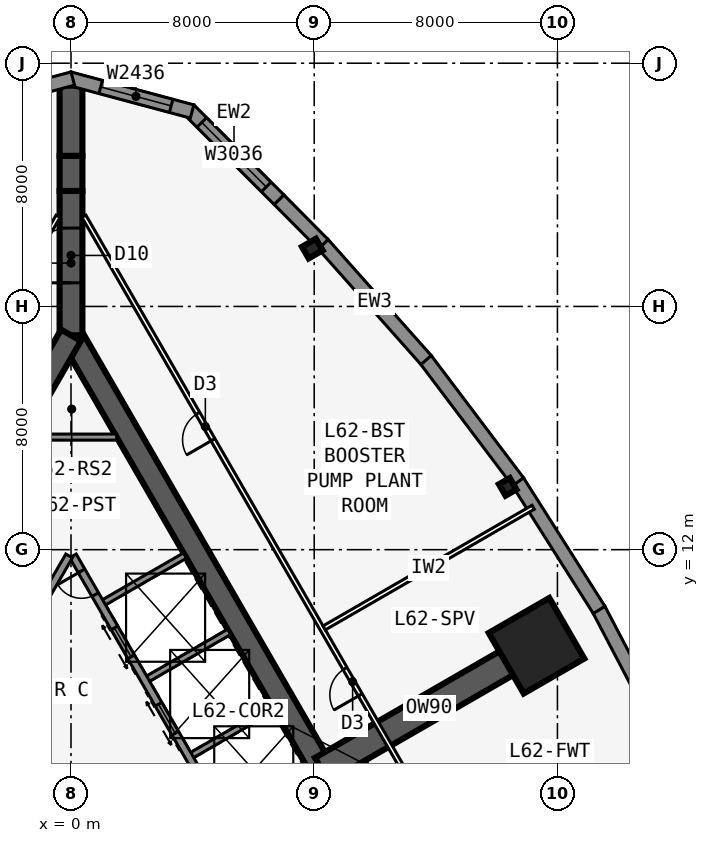
"""IFC4 building model, lengths in metres.
Left out: names, types, materials, properties, quantities, classifications, styles, units other than length and angle.
Written with IfcOpenShell. Run it as: python <this file> out.ifc"""

import sys

from ifc_helpers import new_model, si_unit, direction, frame, frame_2d, origin, origin_2d, place, context, subcontext, project, spatial, polyline, rectangle, i_section, outline, extrude, element, fill, save


model = new_model("IFC4")
c1 = context("Model", 3, precision=1e-05, world=origin(), true_north=direction((0.0, 1.0)))
c2 = subcontext(c1, "Body", "Model", "MODEL_VIEW")
j1 = project(units=[si_unit("LENGTHUNIT", "METRE"), si_unit("PLANEANGLEUNIT", "RADIAN")], contexts=[c1])
p1 = place(None, origin())
s1 = spatial("IfcSite", under=j1, at=p1, CompositionType="ELEMENT")
p2 = place(p1, origin())
s2 = spatial("IfcBuilding", under=s1, at=p2, CompositionType="ELEMENT")
p3 = place(p2, frame((0.0, 0.0, 233.3)))
s3 = spatial("IfcBuildingStorey", under=s2, at=p3, CompositionType="ELEMENT", Elevation=233.3)
p4 = place(p3, frame((8.25, 4.763, 0.0), z_axis=(0.0, 0.0, 1.0), x_axis=(-0.500002952946, 0.866023698893, 0.0)))
e1 = element("IfcWall", 1, at=p4, inside=s3, PredefinedType="SHEAR", context=c2, shape_type="SweptSolid", body=[
    extrude(rectangle(XDim=16.5, YDim=0.75, at=frame_2d((8.25, 0.0))), origin(), (0.0, 0.0, 1.0), 6.0),
])
p5 = place(p3, frame((5.379, 2.586, 0.0), z_axis=(0.0, 0.0, 1.0), x_axis=(-0.500001375892, 0.866024609411, 0.0)))
e2 = element("IfcWall", 2, at=p5, inside=s3, PredefinedType="SOLIDWALL", context=c2, shape_type="SweptSolid", body=[
    extrude(rectangle(XDim=10.633, YDim=0.25, at=frame_2d((5.316, 0.0))), origin(), (0.0, 0.0, 1.0), 5.75),
])
p6 = place(p5, frame((9.164, 0.0, 0.0)))
e3 = element("IfcOpeningElement", 3, at=p6, cuts=e2, PredefinedType="OPENING", context=c2, shape_type="SweptSolid", body=[
    extrude(rectangle(XDim=0.9, YDim=2.13, at=frame_2d((0.45, 1.065))), frame((0.0, 0.135, 0.0), z_axis=(0.0, -1.0, 0.0), x_axis=(1.0, 0.0, 0.0)), (0.0, 0.0, 1.0), 0.27),
])
p7 = place(p5, frame((1.0, 0.0, 0.0)))
e4 = element("IfcOpeningElement", 4, at=p7, cuts=e2, PredefinedType="OPENING", context=c2, shape_type="SweptSolid", body=[
    extrude(rectangle(XDim=1.1, YDim=2.13, at=frame_2d((0.55, 1.065))), frame((0.0, 0.135, 0.0), z_axis=(0.0, -1.0, 0.0), x_axis=(1.0, 0.0, 0.0)), (0.0, 0.0, 1.0), 0.27),
])
p8 = place(p5, frame((3.9, 0.0, 0.0)))
e5 = element("IfcOpeningElement", 5, at=p8, cuts=e2, PredefinedType="OPENING", context=c2, shape_type="SweptSolid", body=[
    extrude(rectangle(XDim=1.1, YDim=2.13, at=frame_2d((0.55, 1.065))), frame((0.0, 0.135, 0.0), z_axis=(0.0, -1.0, 0.0), x_axis=(1.0, 0.0, 0.0)), (0.0, 0.0, 1.0), 0.27),
])
p9 = place(p5, frame((6.8, 0.0, 0.0)))
e6 = element("IfcOpeningElement", 6, at=p9, cuts=e2, PredefinedType="OPENING", context=c2, shape_type="SweptSolid", body=[
    extrude(rectangle(XDim=1.1, YDim=2.13, at=frame_2d((0.55, 1.065))), frame((0.0, 0.135, 0.0), z_axis=(0.0, -1.0, 0.0), x_axis=(1.0, 0.0, 0.0)), (0.0, 0.0, 1.0), 0.27),
])
for number, where, z_axis, x_axis in (
    (7, (3.879, 5.184, 0.0), (0.0, 0.0, 1.0), (0.866, 0.5, 0.0)),
    (8, (2.429, 7.696, 0.0), (0.0, 0.0, 1.0), (0.866, 0.5, 0.0)),
    (9, (0.979, 10.207, 0.0), (0.0, 0.0, 1.0), (0.866, 0.5, 0.0)),
):
    element("IfcWall", number, at=place(p3, frame(where, z_axis=z_axis, x_axis=x_axis)), inside=s3, PredefinedType="SOLIDWALL", context=c2, shape_type="SweptSolid", body=[
        extrude(rectangle(XDim=3.2, YDim=0.2, at=frame_2d((1.6, 0.0))), origin(), (0.0, 0.0, 1.0), 5.75),
    ])
p10 = place(p3, frame((0.0, 19.052, 0.0), z_axis=(0.0, 0.0, 1.0), x_axis=(-0.500002952946, -0.866023698893, 0.0)))
e10 = element("IfcWall", 10, at=p10, inside=s3, PredefinedType="SHEAR", context=c2, shape_type="SweptSolid", body=[
    extrude(rectangle(XDim=16.5, YDim=0.75, at=frame_2d((8.25, 0.0))), origin(), (0.0, 0.0, 1.0), 6.0),
])
p11 = place(p10, frame((14.15, 0.0, 0.0)))
e11 = element("IfcOpeningElement", 11, at=p11, cuts=e10, PredefinedType="OPENING", context=c2, shape_type="SweptSolid", body=[
    extrude(rectangle(XDim=1.8, YDim=2.13, at=frame_2d((0.9, 1.065))), frame((0.0, 0.385, 0.0), z_axis=(0.0, -1.0, 0.0), x_axis=(1.0, 0.0, 0.0)), (0.0, 0.0, 1.0), 0.77),
])
p12 = place(p10, frame((12.6, 0.0, 0.0)))
e12 = element("IfcOpeningElement", 12, at=p12, cuts=e10, PredefinedType="OPENING", context=c2, shape_type="SweptSolid", body=[
    extrude(rectangle(XDim=1.0, YDim=2.13, at=frame_2d((0.5, 1.065))), frame((0.0, 0.385, 0.0), z_axis=(0.0, -1.0, 0.0), x_axis=(1.0, 0.0, 0.0)), (0.0, 0.0, 1.0), 0.77),
])
p13 = place(p3, frame((-0.062, 11.794, 0.0), z_axis=(0.0, 0.0, 1.0), x_axis=(-0.500006680225, -0.86602154692, 0.0)))
e13 = element("IfcWall", 13, at=p13, inside=s3, PredefinedType="SOLIDWALL", context=c2, shape_type="SweptSolid", body=[
    extrude(rectangle(XDim=7.733, YDim=0.25, at=frame_2d((3.866, 0.0))), origin(), (0.0, 0.0, 1.0), 5.75),
])
p14 = place(p3, frame((0.0, 19.052, 0.0), z_axis=(0.0, 0.0, 1.0), x_axis=(0.0, 1.0, 0.0)))
e14 = element("IfcWall", 14, at=p14, inside=s3, PredefinedType="SHEAR", context=c2, shape_type="SweptSolid", body=[
    extrude(rectangle(XDim=4.746, YDim=0.75, at=frame_2d((2.373, 0.0))), origin(), (0.0, 0.0, 1.0), 6.0),
])
p15 = place(p14, frame((1.725, 0.0, 0.0)))
e15 = element("IfcOpeningElement", 15, at=p15, cuts=e14, PredefinedType="OPENING", context=c2, shape_type="SweptSolid", body=[
    extrude(rectangle(XDim=1.8, YDim=2.13, at=frame_2d((0.9, 1.065))), frame((0.0, 0.385, 0.0), z_axis=(0.0, -1.0, 0.0), x_axis=(1.0, 0.0, 0.0)), (0.0, 0.0, 1.0), 0.77),
])
p16 = place(p3, frame((0.0, 23.799, 0.0), z_axis=(0.0, 0.0, 1.0), x_axis=(0.0, 1.0, 0.0)))
e16 = element("IfcWall", 16, at=p16, inside=s3, PredefinedType="SHEAR", context=c2, shape_type="SweptSolid", body=[
    extrude(rectangle(XDim=1.155, YDim=0.75, at=frame_2d((0.577, 0.0))), origin(), (0.0, 0.0, 1.0), 6.0),
])
p17 = place(p3, frame((0.0, 24.953, 0.0), z_axis=(0.0, 0.0, 1.0), x_axis=(0.0, 1.0, 0.0)))
e17 = element("IfcWall", 17, at=p17, inside=s3, PredefinedType="SHEAR", context=c2, shape_type="SweptSolid", body=[
    extrude(rectangle(XDim=2.309, YDim=0.75, at=frame_2d((1.155, 0.0))), origin(), (0.0, 0.0, 1.0), 6.0),
])
p18 = place(p3, frame((8.25, 4.763, 0.0), z_axis=(0.0, 0.0, 1.0), x_axis=(0.866023543838, 0.500003221507, 0.0)))
e18 = element("IfcWall", 18, at=p18, inside=s3, PredefinedType="SHEAR", context=c2, shape_type="SweptSolid", body=[
    extrude(rectangle(XDim=8.154, YDim=0.9, at=frame_2d((4.077, 0.0))), origin(), (0.0, 0.0, 1.0), 6.0),
])
p19 = place(p3, frame((14.363, 14.066, 0.0), z_axis=(0.0, 0.0, 1.0), x_axis=(0.866025403784, 0.5, 0.0)))
e19 = element("IfcColumn", 19, at=p19, inside=s3, PredefinedType="COLUMN", context=c2, shape_type="SweptSolid", body=[
    extrude(i_section(OverallWidth=0.411, OverallDepth=0.434, WebThickness=0.036, FlangeThickness=0.057, at=origin_2d()), origin(), (0.0, 0.0, 1.0), 6.0),
])
p20 = place(p3, frame((7.937, 21.903, 0.0), z_axis=(0.0, 0.0, 1.0), x_axis=(-0.5, 0.866025403784, 0.0)))
e20 = element("IfcColumn", 20, at=p20, inside=s3, PredefinedType="COLUMN", context=c2, shape_type="SweptSolid", body=[
    extrude(i_section(OverallWidth=0.442, OverallDepth=0.531, WebThickness=0.066, FlangeThickness=0.106, at=origin_2d()), origin(), (0.0, 0.0, 1.0), 6.0),
])
p21 = place(p3, frame((15.312, 8.84, 0.0), z_axis=(0.0, 0.0, 1.0), x_axis=(0.866025403784, 0.5, 0.0)))
e21 = element("IfcColumn", 21, at=p21, inside=s3, PredefinedType="COLUMN", context=c2, shape_type="SweptSolid", body=[
    extrude(rectangle(XDim=2.3, YDim=2.3, at=origin_2d()), origin(), (0.0, 0.0, 1.0), 6.0),
])
p22 = place(p3, frame((19.684, 5.602, 0.0), z_axis=(0.0, 0.0, 1.0), x_axis=(-0.463976002579, 0.885847768542, 0.0)))
e22 = element("IfcWall", 22, at=p22, inside=s3, PredefinedType="SOLIDWALL", context=c2, shape_type="SweptSolid", body=[
    extrude(outline(polyline([(0.0, 0.0), (5.004, 0.0), (5.004, 5.75), (0.0, 5.75), (0.0, 0.0)]), holes=[polyline([(4.402, 2.875), (4.337, 3.367), (4.147, 3.825), (3.846, 4.219), (3.452, 4.52), (2.994, 4.71), (2.502, 4.775), (2.01, 4.71), (1.552, 4.52), (1.159, 4.219), (0.857, 3.825), (0.667, 3.367), (0.602, 2.875), (0.667, 2.383), (0.857, 1.925), (1.159, 1.531), (1.552, 1.229), (2.01, 1.04), (2.502, 0.975), (2.994, 1.04), (3.452, 1.229), (3.846, 1.531), (4.147, 1.925), (4.337, 2.383), (4.402, 2.875)])]), frame((0.0, 0.225, 0.0), z_axis=(0.0, -1.0, 0.0), x_axis=(1.0, 0.0, 0.0)), (0.0, 0.0, 1.0), 0.45),
])
p23 = place(p3, frame((17.371, 10.019, 0.0), z_axis=(0.0, 0.0, 1.0), x_axis=(-0.535242418236, 0.844698498709, 0.0)))
e23 = element("IfcWall", 23, at=p23, inside=s3, PredefinedType="SOLIDWALL", context=c2, shape_type="SweptSolid", body=[
    extrude(outline(polyline([(0.0, 0.0), (5.004, 0.0), (5.004, 5.75), (0.0, 5.75), (0.0, 0.0)]), holes=[polyline([(4.402, 2.875), (4.337, 3.367), (4.148, 3.825), (3.846, 4.219), (3.452, 4.52), (2.994, 4.71), (2.502, 4.775), (2.01, 4.71), (1.552, 4.52), (1.159, 4.219), (0.857, 3.825), (0.667, 3.367), (0.602, 2.875), (0.667, 2.383), (0.857, 1.925), (1.159, 1.531), (1.552, 1.229), (2.01, 1.04), (2.502, 0.975), (2.994, 1.04), (3.452, 1.229), (3.846, 1.531), (4.148, 1.925), (4.337, 2.383), (4.402, 2.875)])]), frame((0.0, 0.225, 0.0), z_axis=(0.0, -1.0, 0.0), x_axis=(1.0, 0.0, 0.0)), (0.0, 0.0, 1.0), 0.45),
])
p24 = place(p3, frame((14.703, 14.231, 0.0), z_axis=(0.0, 0.0, 1.0), x_axis=(-0.602408653511, 0.798187831388, 0.0)))
e24 = element("IfcWall", 24, at=p24, inside=s3, PredefinedType="SOLIDWALL", context=c2, shape_type="SweptSolid", body=[
    extrude(outline(polyline([(0.0, 0.0), (5.038, 0.0), (5.038, 5.75), (0.0, 5.75), (0.0, 0.0)]), holes=[polyline([(4.419, 2.875), (4.354, 3.367), (4.164, 3.825), (3.863, 4.219), (3.469, 4.52), (3.011, 4.71), (2.519, 4.775), (2.027, 4.71), (1.569, 4.52), (1.176, 4.219), (0.874, 3.825), (0.684, 3.367), (0.619, 2.875), (0.684, 2.383), (0.874, 1.925), (1.176, 1.531), (1.569, 1.229), (2.027, 1.04), (2.519, 0.975), (3.011, 1.04), (3.469, 1.229), (3.863, 1.531), (4.164, 1.925), (4.354, 2.383), (4.419, 2.875)])]), frame((0.0, 0.225, 0.0), z_axis=(0.0, -1.0, 0.0), x_axis=(1.0, 0.0, 0.0)), (0.0, 0.0, 1.0), 0.45),
])
p25 = place(p3, frame((11.68, 18.238, 0.0), z_axis=(0.0, 0.0, 1.0), x_axis=(-0.664375712375, 0.747398764253, 0.0)))
e25 = element("IfcWall", 25, at=p25, inside=s3, PredefinedType="SOLIDWALL", context=c2, shape_type="SweptSolid", body=[
    extrude(outline(polyline([(0.0, 0.0), (5.105, 0.0), (5.105, 5.75), (0.0, 5.75), (0.0, 0.0)]), holes=[polyline([(4.502, 2.875), (4.436, 3.38), (4.241, 3.85), (3.931, 4.254), (3.527, 4.564), (3.057, 4.759), (2.552, 4.825), (2.048, 4.759), (1.577, 4.564), (1.174, 4.254), (0.864, 3.85), (0.669, 3.38), (0.602, 2.875), (0.669, 2.37), (0.864, 1.9), (1.174, 1.496), (1.577, 1.186), (2.048, 0.991), (2.552, 0.925), (3.057, 0.991), (3.527, 1.186), (3.931, 1.496), (4.241, 1.9), (4.436, 2.37), (4.502, 2.875)])]), frame((0.0, 0.225, 0.0), z_axis=(0.0, -1.0, 0.0), x_axis=(1.0, 0.0, 0.0)), (0.0, 0.0, 1.0), 0.45),
])
p26 = place(p3, frame((8.297, 22.044, 0.0), z_axis=(0.0, 0.0, 1.0), x_axis=(-0.704208960141, 0.709992774933, 0.0)))
e26 = element("IfcWall", 26, at=p26, inside=s3, PredefinedType="SOLIDWALL", context=c2, shape_type="SweptSolid", body=[
    extrude(rectangle(XDim=2.068, YDim=0.45, at=frame_2d((1.034, 0.0))), origin(), (0.0, 0.0, 1.0), 5.75),
])
p27 = place(p3, frame((6.841, 23.512, 0.0), z_axis=(0.0, 0.0, 1.0), x_axis=(-0.707106781187, 0.707106781187, 0.0)))
e27 = element("IfcWall", 27, at=p27, inside=s3, PredefinedType="SOLIDWALL", context=c2, shape_type="SweptSolid", body=[
    extrude(rectangle(XDim=4.184, YDim=0.45, at=frame_2d((2.092, 0.0))), origin(), (0.0, 0.0, 1.0), 5.75),
])
p28 = place(p27, frame((0.592, 0.0, 0.9)))
e28 = element("IfcOpeningElement", 28, at=p28, cuts=e27, PredefinedType="OPENING", context=c2, shape_type="SweptSolid", body=[
    extrude(rectangle(XDim=3.0, YDim=3.6, at=frame_2d((1.5, 1.8))), frame((0.0, 0.235, 0.0), z_axis=(0.0, -1.0, 0.0), x_axis=(1.0, 0.0, 0.0)), (0.0, 0.0, 1.0), 0.47),
])
p29 = place(p3, frame((3.983, 26.413, 0.0), z_axis=(0.0, 0.0, 1.0), x_axis=(-0.965920442324, 0.258839137498, 0.0)))
e29 = element("IfcWall", 29, at=p29, inside=s3, PredefinedType="SOLIDWALL", context=c2, shape_type="SweptSolid", body=[
    extrude(outline(polyline([(4.184, 0.225), (4.124, 0.225), (3.706, 0.113), (3.676, 0.225), (0.0, 0.225), (0.0, -0.225), (4.184, -0.225), (4.184, 0.225)])), origin(), (0.0, 0.0, 1.0), 5.75),
])
p30 = place(p29, frame((0.713, 0.0, 0.9)))
e30 = element("IfcOpeningElement", 30, at=p30, cuts=e29, PredefinedType="OPENING", context=c2, shape_type="SweptSolid", body=[
    extrude(rectangle(XDim=2.4, YDim=3.6, at=frame_2d((1.2, 1.8))), frame((0.0, 0.235, 0.0), z_axis=(0.0, -1.0, 0.0), x_axis=(1.0, 0.0, 0.0)), (0.0, 0.0, 1.0), 0.47),
])
p31 = place(p3, frame((0.058, 27.496, 0.0), z_axis=(0.0, 0.0, 1.0), x_axis=(-0.965920442324, -0.258839137498, 0.0)))
e31 = element("IfcWall", 31, at=p31, inside=s3, PredefinedType="SOLIDWALL", context=c2, shape_type="SweptSolid", body=[
    extrude(outline(polyline([(4.184, 0.225), (0.509, 0.225), (0.479, 0.113), (0.06, 0.225), (0.0, 0.225), (0.0, -0.225), (4.184, -0.225), (4.184, 0.225)])), origin(), (0.0, 0.0, 1.0), 5.75),
])
p32 = place(p31, frame((1.071, 0.0, 0.9)))
e32 = element("IfcOpeningElement", 32, at=p32, cuts=e31, PredefinedType="OPENING", context=c2, shape_type="SweptSolid", body=[
    extrude(rectangle(XDim=2.4, YDim=3.6, at=frame_2d((1.2, 1.8))), frame((0.0, 0.235, 0.0), z_axis=(0.0, -1.0, 0.0), x_axis=(1.0, 0.0, 0.0)), (0.0, 0.0, 1.0), 0.47),
])
p33 = place(p3, frame((20.102, -11.115, 0.0), z_axis=(0.0, 0.0, 1.0), x_axis=(-0.500000265775, 0.866025250339, 0.0)))
e33 = element("IfcWall", 33, at=p33, inside=s3, PredefinedType="PARTITIONING", context=c2, shape_type="SweptSolid", body=[
    extrude(rectangle(XDim=39.354, YDim=0.15, at=frame_2d((19.677, 0.0))), origin(), (0.0, 0.0, 1.0), 5.75),
])
p34 = place(p33, frame((9.489, 0.0, 0.0)))
e34 = element("IfcOpeningElement", 34, at=p34, cuts=e33, PredefinedType="OPENING", context=c2, shape_type="SweptSolid", body=[
    extrude(rectangle(XDim=1.0, YDim=2.13, at=frame_2d((0.5, 1.065))), frame((0.0, 0.085, 0.0), z_axis=(0.0, -1.0, 0.0), x_axis=(1.0, 0.0, 0.0)), (0.0, 0.0, 1.0), 0.17),
])
p35 = place(p33, frame((21.177, 0.0, 0.0)))
e35 = element("IfcOpeningElement", 35, at=p35, cuts=e33, PredefinedType="OPENING", context=c2, shape_type="SweptSolid", body=[
    extrude(rectangle(XDim=1.0, YDim=2.13, at=frame_2d((0.5, 1.065))), frame((0.0, 0.085, 0.0), z_axis=(0.0, -1.0, 0.0), x_axis=(1.0, 0.0, 0.0)), (0.0, 0.0, 1.0), 0.17),
])
p36 = place(p33, frame((30.865, 0.0, 0.0)))
e36 = element("IfcOpeningElement", 36, at=p36, cuts=e33, PredefinedType="OPENING", context=c2, shape_type="SweptSolid", body=[
    extrude(rectangle(XDim=1.0, YDim=2.13, at=frame_2d((0.5, 1.065))), frame((0.0, 0.085, 0.0), z_axis=(0.0, -1.0, 0.0), x_axis=(1.0, 0.0, 0.0)), (0.0, 0.0, 1.0), 0.17),
])
p37 = place(p3, frame((8.329, 9.427, 0.0), z_axis=(0.0, 0.0, 1.0), x_axis=(0.866027296944, 0.499996720937, 0.0)))
e37 = element("IfcWall", 37, at=p37, inside=s3, PredefinedType="PARTITIONING", context=c2, shape_type="SweptSolid", body=[
    extrude(rectangle(XDim=7.937, YDim=0.15, at=frame_2d((3.968, 0.0))), origin(), (0.0, 0.0, 1.0), 5.75),
])
p38 = place(p3, frame((-0.425, 22.966, 0.0), z_axis=(0.0, 0.0, 1.0), x_axis=(-0.500000265775, -0.866025250339, 0.0)))
e38 = element("IfcWall", 38, at=p38, inside=s3, PredefinedType="PARTITIONING", context=c2, shape_type="SweptSolid", body=[
    extrude(rectangle(XDim=39.354, YDim=0.15, at=frame_2d((19.677, 0.0))), origin(), (0.0, 0.0, 1.0), 5.75),
])
p39 = place(p38, frame((7.489, 0.0, 0.0)))
e39 = element("IfcOpeningElement", 39, at=p39, cuts=e38, PredefinedType="OPENING", context=c2, shape_type="SweptSolid", body=[
    extrude(rectangle(XDim=1.0, YDim=2.13, at=frame_2d((0.5, 1.065))), frame((0.0, 0.085, 0.0), z_axis=(0.0, -1.0, 0.0), x_axis=(1.0, 0.0, 0.0)), (0.0, 0.0, 1.0), 0.17),
])
p40 = place(p38, frame((17.177, 0.0, 0.0)))
e40 = element("IfcOpeningElement", 40, at=p40, cuts=e38, PredefinedType="OPENING", context=c2, shape_type="SweptSolid", body=[
    extrude(rectangle(XDim=1.0, YDim=2.13, at=frame_2d((0.5, 1.065))), frame((0.0, 0.085, 0.0), z_axis=(0.0, -1.0, 0.0), x_axis=(1.0, 0.0, 0.0)), (0.0, 0.0, 1.0), 0.17),
])
p41 = place(p38, frame((28.865, 0.0, 0.0)))
e41 = element("IfcOpeningElement", 41, at=p41, cuts=e38, PredefinedType="OPENING", context=c2, shape_type="SweptSolid", body=[
    extrude(rectangle(XDim=1.0, YDim=2.13, at=frame_2d((0.5, 1.065))), frame((0.0, 0.085, 0.0), z_axis=(0.0, -1.0, 0.0), x_axis=(1.0, 0.0, 0.0)), (0.0, 0.0, 1.0), 0.17),
])
p42 = place(p3, frame((-1.501, 15.703, 0.0), z_axis=(0.0, 0.0, 1.0), x_axis=(1.0, 0.0, 0.0)))
e42 = element("IfcWall", 42, at=p42, inside=s3, PredefinedType="SOLIDWALL", context=c2, shape_type="SweptSolid", body=[
    extrude(rectangle(XDim=3.002, YDim=0.2, at=frame_2d((1.501, 0.0))), origin(), (0.0, 0.0, 1.0), 5.75),
])
p43 = place(p28, origin())
e43 = element("IfcWindow", 43, at=p43, inside=s3, PartitioningType="SINGLE_PANEL", PredefinedType="WINDOW", context=c2, shape_type="SweptSolid", body=[
    extrude(rectangle(XDim=3.0, YDim=3.6, at=frame_2d((1.5, 1.8))), frame((0.0, 0.03, 0.0), z_axis=(0.0, -1.0, 0.0), x_axis=(1.0, 0.0, 0.0)), (0.0, 0.0, 1.0), 0.06),
])
fill(e28, e43)
p44 = place(p30, origin())
e44 = element("IfcWindow", 44, at=p44, inside=s3, PartitioningType="SINGLE_PANEL", PredefinedType="WINDOW", context=c2, shape_type="SweptSolid", body=[
    extrude(rectangle(XDim=2.4, YDim=3.6, at=frame_2d((1.2, 1.8))), frame((0.0, 0.03, 0.0), z_axis=(0.0, -1.0, 0.0), x_axis=(1.0, 0.0, 0.0)), (0.0, 0.0, 1.0), 0.06),
])
fill(e30, e44)
p45 = place(p35, origin())
e45 = element("IfcDoor", 45, at=p45, inside=s3, OperationType="SINGLE_SWING_LEFT", PredefinedType="DOOR", context=c2, shape_type="SweptSolid", body=[
    extrude(rectangle(XDim=1.0, YDim=2.13, at=frame_2d((0.5, 1.065))), frame((0.0, 0.025, 0.0), z_axis=(0.0, -1.0, 0.0), x_axis=(1.0, 0.0, 0.0)), (0.0, 0.0, 1.0), 0.05),
])
fill(e35, e45)
p46 = place(p36, origin())
e46 = element("IfcDoor", 46, at=p46, inside=s3, OperationType="SINGLE_SWING_LEFT", PredefinedType="DOOR", context=c2, shape_type="SweptSolid", body=[
    extrude(rectangle(XDim=1.0, YDim=2.13, at=frame_2d((0.5, 1.065))), frame((0.0, 0.025, 0.0), z_axis=(0.0, -1.0, 0.0), x_axis=(1.0, 0.0, 0.0)), (0.0, 0.0, 1.0), 0.05),
])
fill(e36, e46)
p47 = place(p15, origin())
e47 = element("IfcDoor", 47, at=p47, inside=s3, OperationType="DOUBLE_DOOR_DOUBLE_SWING", PredefinedType="DOOR", context=c2, shape_type="SweptSolid", body=[
    extrude(rectangle(XDim=1.8, YDim=2.13, at=frame_2d((0.9, 1.065))), frame((0.0, 0.025, 0.0), z_axis=(0.0, -1.0, 0.0), x_axis=(1.0, 0.0, 0.0)), (0.0, 0.0, 1.0), 0.05),
])
fill(e15, e47)
p48 = place(p6, origin())
e48 = element("IfcDoor", 48, at=p48, inside=s3, OperationType="SINGLE_SWING_RIGHT", PredefinedType="DOOR", context=c2, shape_type="SweptSolid", body=[
    extrude(rectangle(XDim=0.9, YDim=2.13, at=frame_2d((0.45, 1.065))), frame((0.0, 0.025, 0.0), z_axis=(0.0, -1.0, 0.0), x_axis=(1.0, 0.0, 0.0)), (0.0, 0.0, 1.0), 0.05),
])
fill(e3, e48)
p49 = place(p8, origin())
e49 = element("IfcDoor", 49, at=p49, inside=s3, OperationType="DOUBLE_DOOR_SLIDING", PredefinedType="USERDEFINED", context=c2, shape_type="SweptSolid", body=[
    extrude(rectangle(XDim=1.1, YDim=2.13, at=frame_2d((0.55, 1.065))), frame((0.0, 0.025, 0.0), z_axis=(0.0, -1.0, 0.0), x_axis=(1.0, 0.0, 0.0)), (0.0, 0.0, 1.0), 0.05),
])
fill(e5, e49)
p50 = place(p9, origin())
e50 = element("IfcDoor", 50, at=p50, inside=s3, OperationType="DOUBLE_DOOR_SLIDING", PredefinedType="USERDEFINED", context=c2, shape_type="SweptSolid", body=[
    extrude(rectangle(XDim=1.1, YDim=2.13, at=frame_2d((0.55, 1.065))), frame((0.0, 0.025, 0.0), z_axis=(0.0, -1.0, 0.0), x_axis=(1.0, 0.0, 0.0)), (0.0, 0.0, 1.0), 0.05),
])
fill(e6, e50)
save(model, sys.argv[1])
